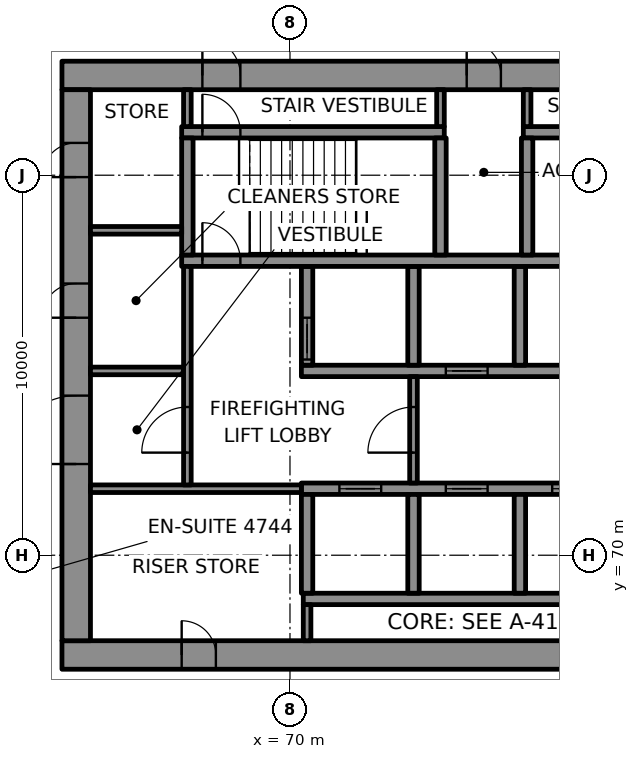
"""IFC4 building model, lengths in metres.
Left out: names, types, materials, properties, quantities, classifications, styles, units other than length and angle.
Written with IfcOpenShell. Run it as: python <this file> out.ifc"""

import sys

from ifc_helpers import new_model, si_unit, direction, frame, frame_2d, origin, place, context, subcontext, project, spatial, rectangle, extrude, element, fill, save


model = new_model("IFC4")
c1 = context("Model", 3, precision=1e-05, world=origin(), true_north=direction((0.0, 1.0)))
c2 = subcontext(c1, "Body", "Model", "MODEL_VIEW")
j1 = project(units=[si_unit("LENGTHUNIT", "METRE"), si_unit("PLANEANGLEUNIT", "RADIAN")], contexts=[c1])
p1 = place(None, origin())
s1 = spatial("IfcSite", under=j1, at=p1, CompositionType="ELEMENT")
p2 = place(p1, origin())
s2 = spatial("IfcBuilding", under=s1, at=p2, CompositionType="ELEMENT")
p3 = place(p2, frame((0.0, 0.0, 202.6)))
s3 = spatial("IfcBuildingStorey", under=s2, at=p3, CompositionType="ELEMENT", Elevation=202.6)
p4 = place(p3, frame((64.0, 67.375, 0.0), z_axis=(0.0, 0.0, 1.0), x_axis=(1.0, 0.0, 0.0)))
e1 = element("IfcWall", 1, at=p4, inside=s3, PredefinedType="SHEAR", context=c2, shape_type="SweptSolid", body=[
    extrude(rectangle(XDim=22.0, YDim=0.75, at=frame_2d((11.0, 0.0))), origin(), (0.0, 0.0, 1.0), 3.7),
])
p5 = place(p4, frame((3.15, 0.0, 0.0)))
e2 = element("IfcOpeningElement", 2, at=p5, cuts=e1, PredefinedType="OPENING", context=c2, shape_type="SweptSolid", body=[
    extrude(rectangle(XDim=0.9, YDim=2.1, at=frame_2d((0.45, 1.05))), frame((0.0, 0.385, 0.0), z_axis=(0.0, -1.0, 0.0), x_axis=(1.0, 0.0, 0.0)), (0.0, 0.0, 1.0), 0.77),
])
p6 = place(p3, frame((64.0, 82.625, 0.0), z_axis=(0.0, 0.0, 1.0), x_axis=(1.0, 0.0, 0.0)))
e3 = element("IfcWall", 3, at=p6, inside=s3, PredefinedType="SHEAR", context=c2, shape_type="SweptSolid", body=[
    extrude(rectangle(XDim=22.0, YDim=0.75, at=frame_2d((11.0, 0.0))), origin(), (0.0, 0.0, 1.0), 3.7),
])
p7 = place(p6, frame((3.695, 0.0, 0.0)))
e4 = element("IfcOpeningElement", 4, at=p7, cuts=e3, PredefinedType="OPENING", context=c2, shape_type="SweptSolid", body=[
    extrude(rectangle(XDim=1.0, YDim=2.1, at=frame_2d((0.5, 1.05))), frame((0.0, 0.385, 0.0), z_axis=(0.0, -1.0, 0.0), x_axis=(1.0, 0.0, 0.0)), (0.0, 0.0, 1.0), 0.77),
])
p8 = place(p6, frame((17.505, 0.0, 0.0)))
e5 = element("IfcOpeningElement", 5, at=p8, cuts=e3, PredefinedType="OPENING", context=c2, shape_type="SweptSolid", body=[
    extrude(rectangle(XDim=1.0, YDim=2.1, at=frame_2d((0.5, 1.05))), frame((0.0, 0.385, 0.0), z_axis=(0.0, -1.0, 0.0), x_axis=(1.0, 0.0, 0.0)), (0.0, 0.0, 1.0), 0.77),
])
p9 = place(p6, frame((10.65, 0.0, 0.0)))
e6 = element("IfcOpeningElement", 6, at=p9, cuts=e3, PredefinedType="OPENING", context=c2, shape_type="SweptSolid", body=[
    extrude(rectangle(XDim=0.9, YDim=2.1, at=frame_2d((0.45, 1.05))), frame((0.0, 0.385, 0.0), z_axis=(0.0, -1.0, 0.0), x_axis=(1.0, 0.0, 0.0)), (0.0, 0.0, 1.0), 0.77),
])
p10 = place(p3, frame((64.375, 67.75, 0.0), z_axis=(0.0, 0.0, 1.0), x_axis=(0.0, 1.0, 0.0)))
e7 = element("IfcWall", 7, at=p10, inside=s3, PredefinedType="SHEAR", context=c2, shape_type="SweptSolid", body=[
    extrude(rectangle(XDim=14.5, YDim=0.75, at=frame_2d((7.25, 0.0))), origin(), (0.0, 0.0, 1.0), 3.7),
])
p11 = place(p10, frame((4.65, 0.0, 0.0)))
e8 = element("IfcOpeningElement", 8, at=p11, cuts=e7, PredefinedType="OPENING", context=c2, shape_type="SweptSolid", body=[
    extrude(rectangle(XDim=1.8, YDim=2.1, at=frame_2d((0.9, 1.05))), frame((0.0, 0.385, 0.0), z_axis=(0.0, -1.0, 0.0), x_axis=(1.0, 0.0, 0.0)), (0.0, 0.0, 1.0), 0.77),
])
p12 = place(p10, frame((8.5, 0.0, 0.0)))
e9 = element("IfcOpeningElement", 9, at=p12, cuts=e7, PredefinedType="OPENING", context=c2, shape_type="SweptSolid", body=[
    extrude(rectangle(XDim=0.9, YDim=2.1, at=frame_2d((0.45, 1.05))), frame((0.0, 0.385, 0.0), z_axis=(0.0, -1.0, 0.0), x_axis=(1.0, 0.0, 0.0)), (0.0, 0.0, 1.0), 0.77),
])
p13 = place(p10, frame((12.2, 0.0, 0.0)))
e10 = element("IfcOpeningElement", 10, at=p13, cuts=e7, PredefinedType="OPENING", context=c2, shape_type="SweptSolid", body=[
    extrude(rectangle(XDim=0.9, YDim=2.1, at=frame_2d((0.45, 1.05))), frame((0.0, 0.385, 0.0), z_axis=(0.0, -1.0, 0.0), x_axis=(1.0, 0.0, 0.0)), (0.0, 0.0, 1.0), 0.77),
])
p14 = place(p3, frame((70.35, 68.85, 0.0), z_axis=(0.0, 0.0, 1.0), x_axis=(1.0, 0.0, 0.0)))
e11 = element("IfcWall", 11, at=p14, inside=s3, PredefinedType="SHEAR", context=c2, shape_type="SweptSolid", body=[
    extrude(rectangle(XDim=14.2, YDim=0.3, at=frame_2d((7.1, 0.0))), origin(), (0.0, 0.0, 1.0), 3.7),
])
p15 = place(p3, frame((70.3, 71.75, 0.0), z_axis=(0.0, 0.0, 1.0), x_axis=(1.0, 0.0, 0.0)))
e12 = element("IfcWall", 12, at=p15, inside=s3, PredefinedType="SHEAR", context=c2, shape_type="SweptSolid", body=[
    extrude(rectangle(XDim=14.3, YDim=0.3, at=frame_2d((7.15, 0.0))), origin(), (0.0, 0.0, 1.0), 3.7),
])
p16 = place(p15, frame((1.0, 0.0, 0.0)))
e13 = element("IfcOpeningElement", 13, at=p16, cuts=e12, PredefinedType="OPENING", context=c2, shape_type="SweptSolid", body=[
    extrude(rectangle(XDim=1.1, YDim=2.1, at=frame_2d((0.55, 1.05))), frame((0.0, 0.16, 0.0), z_axis=(0.0, -1.0, 0.0), x_axis=(1.0, 0.0, 0.0)), (0.0, 0.0, 1.0), 0.32),
])
p17 = place(p15, frame((3.8, 0.0, 0.0)))
e14 = element("IfcOpeningElement", 14, at=p17, cuts=e12, PredefinedType="OPENING", context=c2, shape_type="SweptSolid", body=[
    extrude(rectangle(XDim=1.1, YDim=2.1, at=frame_2d((0.55, 1.05))), frame((0.0, 0.16, 0.0), z_axis=(0.0, -1.0, 0.0), x_axis=(1.0, 0.0, 0.0)), (0.0, 0.0, 1.0), 0.32),
])
p18 = place(p15, frame((6.6, 0.0, 0.0)))
e15 = element("IfcOpeningElement", 15, at=p18, cuts=e12, PredefinedType="OPENING", context=c2, shape_type="SweptSolid", body=[
    extrude(rectangle(XDim=1.1, YDim=2.1, at=frame_2d((0.55, 1.05))), frame((0.0, 0.16, 0.0), z_axis=(0.0, -1.0, 0.0), x_axis=(1.0, 0.0, 0.0)), (0.0, 0.0, 1.0), 0.32),
])
p19 = place(p15, frame((9.4, 0.0, 0.0)))
e16 = element("IfcOpeningElement", 16, at=p19, cuts=e12, PredefinedType="OPENING", context=c2, shape_type="SweptSolid", body=[
    extrude(rectangle(XDim=1.1, YDim=2.1, at=frame_2d((0.55, 1.05))), frame((0.0, 0.16, 0.0), z_axis=(0.0, -1.0, 0.0), x_axis=(1.0, 0.0, 0.0)), (0.0, 0.0, 1.0), 0.32),
])
p20 = place(p15, frame((12.2, 0.0, 0.0)))
e17 = element("IfcOpeningElement", 17, at=p20, cuts=e12, PredefinedType="OPENING", context=c2, shape_type="SweptSolid", body=[
    extrude(rectangle(XDim=1.1, YDim=2.1, at=frame_2d((0.55, 1.05))), frame((0.0, 0.16, 0.0), z_axis=(0.0, -1.0, 0.0), x_axis=(1.0, 0.0, 0.0)), (0.0, 0.0, 1.0), 0.32),
])
p21 = place(p3, frame((70.3, 74.85, 0.0), z_axis=(0.0, 0.0, 1.0), x_axis=(1.0, 0.0, 0.0)))
e18 = element("IfcWall", 18, at=p21, inside=s3, PredefinedType="SHEAR", context=c2, shape_type="SweptSolid", body=[
    extrude(rectangle(XDim=14.3, YDim=0.3, at=frame_2d((7.15, 0.0))), origin(), (0.0, 0.0, 1.0), 3.7),
])
p22 = place(p21, frame((3.8, 0.0, 0.0)))
e19 = element("IfcOpeningElement", 19, at=p22, cuts=e18, PredefinedType="OPENING", context=c2, shape_type="SweptSolid", body=[
    extrude(rectangle(XDim=1.1, YDim=2.1, at=frame_2d((0.55, 1.05))), frame((0.0, 0.16, 0.0), z_axis=(0.0, -1.0, 0.0), x_axis=(1.0, 0.0, 0.0)), (0.0, 0.0, 1.0), 0.32),
])
p23 = place(p21, frame((12.2, 0.0, 0.0)))
e20 = element("IfcOpeningElement", 20, at=p23, cuts=e18, PredefinedType="OPENING", context=c2, shape_type="SweptSolid", body=[
    extrude(rectangle(XDim=1.1, YDim=2.1, at=frame_2d((0.55, 1.05))), frame((0.0, 0.16, 0.0), z_axis=(0.0, -1.0, 0.0), x_axis=(1.0, 0.0, 0.0)), (0.0, 0.0, 1.0), 0.32),
])
p24 = place(p3, frame((70.45, 69.0, 0.0), z_axis=(0.0, 0.0, 1.0), x_axis=(0.0, 1.0, 0.0)))
e21 = element("IfcWall", 21, at=p24, inside=s3, PredefinedType="SHEAR", context=c2, shape_type="SweptSolid", body=[
    extrude(rectangle(XDim=2.6, YDim=0.3, at=frame_2d((1.3, 0.0))), origin(), (0.0, 0.0, 1.0), 3.7),
])
p25 = place(p3, frame((70.45, 75.0, 0.0), z_axis=(0.0, 0.0, 1.0), x_axis=(0.0, 1.0, 0.0)))
e22 = element("IfcWall", 22, at=p25, inside=s3, PredefinedType="SHEAR", context=c2, shape_type="SweptSolid", body=[
    extrude(rectangle(XDim=2.6, YDim=0.3, at=frame_2d((1.3, 0.0))), origin(), (0.0, 0.0, 1.0), 3.7),
])
p26 = place(p25, frame((0.15, 0.0, 0.0)))
e23 = element("IfcOpeningElement", 23, at=p26, cuts=e22, PredefinedType="OPENING", context=c2, shape_type="SweptSolid", body=[
    extrude(rectangle(XDim=1.1, YDim=2.1, at=frame_2d((0.55, 1.05))), frame((0.0, 0.16, 0.0), z_axis=(0.0, -1.0, 0.0), x_axis=(1.0, 0.0, 0.0)), (0.0, 0.0, 1.0), 0.32),
])
for number, where, z_axis, x_axis in (
    (24, (73.25, 69.0, 0.0), (0.0, 0.0, 1.0), (0.0, 1.0, 0.0)),
    (25, (73.25, 75.0, 0.0), (0.0, 0.0, 1.0), (0.0, 1.0, 0.0)),
    (26, (76.05, 69.0, 0.0), (0.0, 0.0, 1.0), (0.0, 1.0, 0.0)),
    (27, (76.05, 75.0, 0.0), (0.0, 0.0, 1.0), (0.0, 1.0, 0.0)),
):
    element("IfcWall", number, at=place(p3, frame(where, z_axis=z_axis, x_axis=x_axis)), inside=s3, PredefinedType="SHEAR", context=c2, shape_type="SweptSolid", body=[
        extrude(rectangle(XDim=2.6, YDim=0.3, at=frame_2d((1.3, 0.0))), origin(), (0.0, 0.0, 1.0), 3.7),
    ])
p27 = place(p3, frame((67.15, 77.75, 0.0), z_axis=(0.0, 0.0, 1.0), x_axis=(1.0, 0.0, 0.0)))
e28 = element("IfcWall", 28, at=p27, inside=s3, PredefinedType="SHEAR", context=c2, shape_type="SweptSolid", body=[
    extrude(rectangle(XDim=17.45, YDim=0.3, at=frame_2d((8.725, 0.0))), origin(), (0.0, 0.0, 1.0), 3.7),
])
p28 = place(p27, frame((0.545, 0.0, 0.0)))
e29 = element("IfcOpeningElement", 29, at=p28, cuts=e28, PredefinedType="OPENING", context=c2, shape_type="SweptSolid", body=[
    extrude(rectangle(XDim=1.0, YDim=2.1, at=frame_2d((0.5, 1.05))), frame((0.0, 0.16, 0.0), z_axis=(0.0, -1.0, 0.0), x_axis=(1.0, 0.0, 0.0)), (0.0, 0.0, 1.0), 0.32),
])
p29 = place(p3, frame((67.15, 81.13, 0.0), z_axis=(0.0, 0.0, 1.0), x_axis=(1.0, 0.0, 0.0)))
e30 = element("IfcWall", 30, at=p29, inside=s3, PredefinedType="SHEAR", context=c2, shape_type="SweptSolid", body=[
    extrude(rectangle(XDim=6.91, YDim=0.3, at=frame_2d((3.455, 0.0))), origin(), (0.0, 0.0, 1.0), 3.7),
])
p30 = place(p29, frame((0.545, 0.0, 0.0)))
e31 = element("IfcOpeningElement", 31, at=p30, cuts=e30, PredefinedType="OPENING", context=c2, shape_type="SweptSolid", body=[
    extrude(rectangle(XDim=1.0, YDim=2.1, at=frame_2d((0.5, 1.05))), frame((0.0, 0.16, 0.0), z_axis=(0.0, -1.0, 0.0), x_axis=(1.0, 0.0, 0.0)), (0.0, 0.0, 1.0), 0.32),
])
p31 = place(p3, frame((76.14, 81.13, 0.0), z_axis=(0.0, 0.0, 1.0), x_axis=(1.0, 0.0, 0.0)))
e32 = element("IfcWall", 32, at=p31, inside=s3, PredefinedType="SHEAR", context=c2, shape_type="SweptSolid", body=[
    extrude(rectangle(XDim=6.86, YDim=0.3, at=frame_2d((3.43, 0.0))), origin(), (0.0, 0.0, 1.0), 3.7),
])
p32 = place(p31, frame((5.365, 0.0, 0.0)))
e33 = element("IfcOpeningElement", 33, at=p32, cuts=e32, PredefinedType="OPENING", context=c2, shape_type="SweptSolid", body=[
    extrude(rectangle(XDim=1.0, YDim=2.1, at=frame_2d((0.5, 1.05))), frame((0.0, 0.16, 0.0), z_axis=(0.0, -1.0, 0.0), x_axis=(1.0, 0.0, 0.0)), (0.0, 0.0, 1.0), 0.32),
])
for number, where, z_axis, x_axis in (
    (34, (67.3, 77.9, 0.0), (0.0, 0.0, 1.0), (0.0, 1.0, 0.0)),
    (35, (73.96, 77.9, 0.0), (0.0, 0.0, 1.0), (0.0, 1.0, 0.0)),
    (36, (76.24, 77.9, 0.0), (0.0, 0.0, 1.0), (0.0, 1.0, 0.0)),
):
    element("IfcWall", number, at=place(p3, frame(where, z_axis=z_axis, x_axis=x_axis)), inside=s3, PredefinedType="SHEAR", context=c2, shape_type="SweptSolid", body=[
        extrude(rectangle(XDim=3.08, YDim=0.3, at=frame_2d((1.54, 0.0))), origin(), (0.0, 0.0, 1.0), 3.7),
    ])
p33 = place(p3, frame((64.75, 71.75, 0.0), z_axis=(0.0, 0.0, 1.0), x_axis=(1.0, 0.0, 0.0)))
e37 = element("IfcWall", 37, at=p33, inside=s3, PredefinedType="PARTITIONING", context=c2, shape_type="SweptSolid", body=[
    extrude(rectangle(XDim=5.55, YDim=0.2, at=frame_2d((2.775, 0.0))), origin(), (0.0, 0.0, 1.0), 3.7),
])
p34 = place(p3, frame((64.75, 74.85, 0.0), z_axis=(0.0, 0.0, 1.0), x_axis=(1.0, 0.0, 0.0)))
e38 = element("IfcWall", 38, at=p34, inside=s3, PredefinedType="PARTITIONING", context=c2, shape_type="SweptSolid", body=[
    extrude(rectangle(XDim=2.45, YDim=0.2, at=frame_2d((1.225, 0.0))), origin(), (0.0, 0.0, 1.0), 3.7),
])
p35 = place(p3, frame((64.75, 78.55, 0.0), z_axis=(0.0, 0.0, 1.0), x_axis=(1.0, 0.0, 0.0)))
e39 = element("IfcWall", 39, at=p35, inside=s3, PredefinedType="PARTITIONING", context=c2, shape_type="SweptSolid", body=[
    extrude(rectangle(XDim=2.4, YDim=0.2, at=frame_2d((1.2, 0.0))), origin(), (0.0, 0.0, 1.0), 3.7),
])
p36 = place(p3, frame((67.3, 71.85, 0.0), z_axis=(0.0, 0.0, 1.0), x_axis=(0.0, 1.0, 0.0)))
e40 = element("IfcWall", 40, at=p36, inside=s3, PredefinedType="PARTITIONING", context=c2, shape_type="SweptSolid", body=[
    extrude(rectangle(XDim=5.75, YDim=0.2, at=frame_2d((2.875, 0.0))), origin(), (0.0, 0.0, 1.0), 3.7),
])
p37 = place(p36, frame((0.85, 0.0, 0.0)))
e41 = element("IfcOpeningElement", 41, at=p37, cuts=e40, PredefinedType="OPENING", context=c2, shape_type="SweptSolid", body=[
    extrude(rectangle(XDim=1.2, YDim=2.1, at=frame_2d((0.6, 1.05))), frame((0.0, 0.11, 0.0), z_axis=(0.0, -1.0, 0.0), x_axis=(1.0, 0.0, 0.0)), (0.0, 0.0, 1.0), 0.22),
])
p38 = place(p3, frame((67.3, 81.28, 0.0), z_axis=(0.0, 0.0, 1.0), x_axis=(0.0, 1.0, 0.0)))
e42 = element("IfcWall", 42, at=p38, inside=s3, PredefinedType="PARTITIONING", context=c2, shape_type="SweptSolid", body=[
    extrude(rectangle(XDim=0.97, YDim=0.2, at=frame_2d((0.485, 0.0))), origin(), (0.0, 0.0, 1.0), 3.7),
])
p39 = place(p3, frame((70.45, 67.75, 0.0), z_axis=(0.0, 0.0, 1.0), x_axis=(0.0, 1.0, 0.0)))
e43 = element("IfcWall", 43, at=p39, inside=s3, PredefinedType="PARTITIONING", context=c2, shape_type="SweptSolid", body=[
    extrude(rectangle(XDim=0.95, YDim=0.2, at=frame_2d((0.475, 0.0))), origin(), (0.0, 0.0, 1.0), 3.7),
])
p40 = place(p3, frame((73.25, 71.9, 0.0), z_axis=(0.0, 0.0, 1.0), x_axis=(0.0, 1.0, 0.0)))
e44 = element("IfcWall", 44, at=p40, inside=s3, PredefinedType="PARTITIONING", context=c2, shape_type="SweptSolid", body=[
    extrude(rectangle(XDim=2.8, YDim=0.2, at=frame_2d((1.4, 0.0))), origin(), (0.0, 0.0, 1.0), 3.7),
])
p41 = place(p40, frame((0.8, 0.0, 0.0)))
e45 = element("IfcOpeningElement", 45, at=p41, cuts=e44, PredefinedType="OPENING", context=c2, shape_type="SweptSolid", body=[
    extrude(rectangle(XDim=1.2, YDim=2.1, at=frame_2d((0.6, 1.05))), frame((0.0, 0.11, 0.0), z_axis=(0.0, -1.0, 0.0), x_axis=(1.0, 0.0, 0.0)), (0.0, 0.0, 1.0), 0.22),
])
for number, where, z_axis, x_axis in (
    (46, (73.96, 81.28, 0.0), (0.0, 0.0, 1.0), (0.0, 1.0, 0.0)),
    (47, (76.24, 81.28, 0.0), (0.0, 0.0, 1.0), (0.0, 1.0, 0.0)),
):
    element("IfcWall", number, at=place(p3, frame(where, z_axis=z_axis, x_axis=x_axis)), inside=s3, PredefinedType="PARTITIONING", context=c2, shape_type="SweptSolid", body=[
        extrude(rectangle(XDim=0.97, YDim=0.2, at=frame_2d((0.485, 0.0))), origin(), (0.0, 0.0, 1.0), 3.7),
    ])
p42 = place(p16, origin())
e48 = element("IfcDoor", 48, at=p42, inside=s3, OperationType="DOUBLE_DOOR_SLIDING", PredefinedType="DOOR", context=c2, shape_type="SweptSolid", body=[
    extrude(rectangle(XDim=1.1, YDim=2.1, at=frame_2d((0.55, 1.05))), frame((0.0, 0.025, 0.0), z_axis=(0.0, -1.0, 0.0), x_axis=(1.0, 0.0, 0.0)), (0.0, 0.0, 1.0), 0.05),
])
fill(e13, e48)
p43 = place(p17, origin())
e49 = element("IfcDoor", 49, at=p43, inside=s3, OperationType="DOUBLE_DOOR_SLIDING", PredefinedType="DOOR", context=c2, shape_type="SweptSolid", body=[
    extrude(rectangle(XDim=1.1, YDim=2.1, at=frame_2d((0.55, 1.05))), frame((0.0, 0.025, 0.0), z_axis=(0.0, -1.0, 0.0), x_axis=(1.0, 0.0, 0.0)), (0.0, 0.0, 1.0), 0.05),
])
fill(e14, e49)
p44 = place(p18, origin())
e50 = element("IfcDoor", 50, at=p44, inside=s3, OperationType="DOUBLE_DOOR_SLIDING", PredefinedType="DOOR", context=c2, shape_type="SweptSolid", body=[
    extrude(rectangle(XDim=1.1, YDim=2.1, at=frame_2d((0.55, 1.05))), frame((0.0, 0.025, 0.0), z_axis=(0.0, -1.0, 0.0), x_axis=(1.0, 0.0, 0.0)), (0.0, 0.0, 1.0), 0.05),
])
fill(e15, e50)
p45 = place(p26, origin())
e51 = element("IfcDoor", 51, at=p45, inside=s3, OperationType="DOUBLE_DOOR_SLIDING", PredefinedType="DOOR", context=c2, shape_type="SweptSolid", body=[
    extrude(rectangle(XDim=1.1, YDim=2.1, at=frame_2d((0.55, 1.05))), frame((0.0, 0.025, 0.0), z_axis=(0.0, -1.0, 0.0), x_axis=(1.0, 0.0, 0.0)), (0.0, 0.0, 1.0), 0.05),
])
fill(e23, e51)
p46 = place(p22, origin())
e52 = element("IfcDoor", 52, at=p46, inside=s3, OperationType="DOUBLE_DOOR_SLIDING", PredefinedType="DOOR", context=c2, shape_type="SweptSolid", body=[
    extrude(rectangle(XDim=1.1, YDim=2.1, at=frame_2d((0.55, 1.05))), frame((0.0, 0.025, 0.0), z_axis=(0.0, -1.0, 0.0), x_axis=(1.0, 0.0, 0.0)), (0.0, 0.0, 1.0), 0.05),
])
fill(e19, e52)
p47 = place(p28, origin())
e53 = element("IfcDoor", 53, at=p47, inside=s3, OperationType="SINGLE_SWING_LEFT", PredefinedType="DOOR", context=c2, shape_type="SweptSolid", body=[
    extrude(rectangle(XDim=1.0, YDim=2.1, at=frame_2d((0.5, 1.05))), frame((0.0, 0.025, 0.0), z_axis=(0.0, -1.0, 0.0), x_axis=(1.0, 0.0, 0.0)), (0.0, 0.0, 1.0), 0.05),
])
fill(e29, e53)
p48 = place(p30, origin())
e54 = element("IfcDoor", 54, at=p48, inside=s3, OperationType="SINGLE_SWING_RIGHT", PredefinedType="DOOR", context=c2, shape_type="SweptSolid", body=[
    extrude(rectangle(XDim=1.0, YDim=2.1, at=frame_2d((0.5, 1.05))), frame((0.0, 0.025, 0.0), z_axis=(0.0, -1.0, 0.0), x_axis=(1.0, 0.0, 0.0)), (0.0, 0.0, 1.0), 0.05),
])
fill(e31, e54)
p49 = place(p7, origin())
e55 = element("IfcDoor", 55, at=p49, inside=s3, OperationType="SINGLE_SWING_LEFT", PredefinedType="DOOR", context=c2, shape_type="SweptSolid", body=[
    extrude(rectangle(XDim=1.0, YDim=2.1, at=frame_2d((0.5, 1.05))), frame((0.0, 0.095, 0.0), z_axis=(0.0, -1.0, 0.0), x_axis=(1.0, 0.0, 0.0)), (0.0, 0.0, 1.0), 0.19),
])
fill(e4, e55)
p50 = place(p41, origin())
e56 = element("IfcDoor", 56, at=p50, inside=s3, OperationType="SINGLE_SWING_LEFT", PredefinedType="DOOR", context=c2, shape_type="SweptSolid", body=[
    extrude(rectangle(XDim=1.2, YDim=2.1, at=frame_2d((0.6, 1.05))), frame((0.0, 0.025, 0.0), z_axis=(0.0, -1.0, 0.0), x_axis=(1.0, 0.0, 0.0)), (0.0, 0.0, 1.0), 0.05),
])
fill(e45, e56)
p51 = place(p37, origin())
e57 = element("IfcDoor", 57, at=p51, inside=s3, OperationType="SINGLE_SWING_RIGHT", PredefinedType="DOOR", context=c2, shape_type="SweptSolid", body=[
    extrude(rectangle(XDim=1.2, YDim=2.1, at=frame_2d((0.6, 1.05))), frame((0.0, 0.025, 0.0), z_axis=(0.0, -1.0, 0.0), x_axis=(1.0, 0.0, 0.0)), (0.0, 0.0, 1.0), 0.05),
])
fill(e41, e57)
p52 = place(p11, origin())
e58 = element("IfcDoor", 58, at=p52, inside=s3, OperationType="SINGLE_SWING_LEFT", PredefinedType="DOOR", context=c2, shape_type="SweptSolid", body=[
    extrude(rectangle(XDim=1.8, YDim=2.1, at=frame_2d((0.9, 1.05))), frame((0.0, 0.095, 0.0), z_axis=(0.0, -1.0, 0.0), x_axis=(1.0, 0.0, 0.0)), (0.0, 0.0, 1.0), 0.19),
])
fill(e8, e58)
p53 = place(p5, origin())
e59 = element("IfcDoor", 59, at=p53, inside=s3, OperationType="SINGLE_SWING_LEFT", PredefinedType="DOOR", context=c2, shape_type="SweptSolid", body=[
    extrude(rectangle(XDim=0.9, YDim=2.1, at=frame_2d((0.45, 1.05))), frame((0.0, 0.095, 0.0), z_axis=(0.0, -1.0, 0.0), x_axis=(1.0, 0.0, 0.0)), (0.0, 0.0, 1.0), 0.19),
])
fill(e2, e59)
p54 = place(p12, origin())
e60 = element("IfcDoor", 60, at=p54, inside=s3, OperationType="SINGLE_SWING_RIGHT", PredefinedType="DOOR", context=c2, shape_type="SweptSolid", body=[
    extrude(rectangle(XDim=0.9, YDim=2.1, at=frame_2d((0.45, 1.05))), frame((0.0, 0.095, 0.0), z_axis=(0.0, -1.0, 0.0), x_axis=(1.0, 0.0, 0.0)), (0.0, 0.0, 1.0), 0.19),
])
fill(e9, e60)
p55 = place(p13, origin())
e61 = element("IfcDoor", 61, at=p55, inside=s3, OperationType="SINGLE_SWING_LEFT", PredefinedType="DOOR", context=c2, shape_type="SweptSolid", body=[
    extrude(rectangle(XDim=0.9, YDim=2.1, at=frame_2d((0.45, 1.05))), frame((0.0, 0.095, 0.0), z_axis=(0.0, -1.0, 0.0), x_axis=(1.0, 0.0, 0.0)), (0.0, 0.0, 1.0), 0.19),
])
fill(e10, e61)
p56 = place(p9, origin())
e62 = element("IfcDoor", 62, at=p56, inside=s3, OperationType="SINGLE_SWING_RIGHT", PredefinedType="DOOR", context=c2, shape_type="SweptSolid", body=[
    extrude(rectangle(XDim=0.9, YDim=2.1, at=frame_2d((0.45, 1.05))), frame((0.0, 0.095, 0.0), z_axis=(0.0, -1.0, 0.0), x_axis=(1.0, 0.0, 0.0)), (0.0, 0.0, 1.0), 0.19),
])
fill(e6, e62)
save(model, sys.argv[1])
